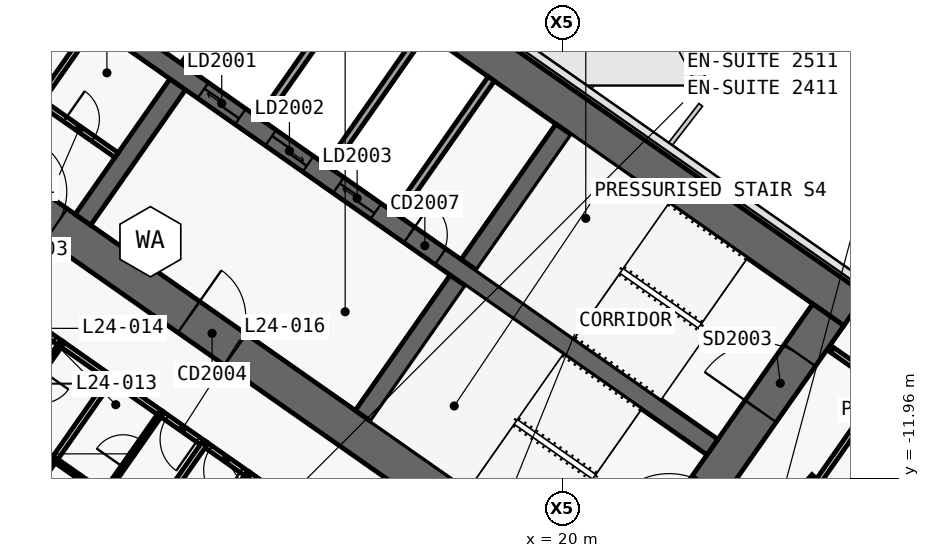
"""IFC4 building model, lengths in metres.
Left out: names, types, materials, properties, quantities, classifications, styles, units other than length and angle.
Written with IfcOpenShell. Run it as: python <this file> out.ifc"""

import sys

from ifc_helpers import new_model, si_unit, direction, frame, frame_2d, origin, place, context, subcontext, project, spatial, polyline, rectangle, outline, extrude, element, fill, save


model = new_model("IFC4")
c1 = context("Model", 3, precision=1e-05, world=origin(), true_north=direction((0.0, 1.0)))
c2 = subcontext(c1, "Body", "Model", "MODEL_VIEW")
j1 = project(units=[si_unit("LENGTHUNIT", "METRE"), si_unit("PLANEANGLEUNIT", "RADIAN")], contexts=[c1])
p1 = place(None, origin())
s1 = spatial("IfcSite", under=j1, at=p1, CompositionType="ELEMENT")
p2 = place(p1, origin())
s2 = spatial("IfcBuilding", under=s1, at=p2, CompositionType="ELEMENT")
p3 = place(p2, frame((0.0, 0.0, 112.1)))
s3 = spatial("IfcBuildingStorey", under=s2, at=p3, CompositionType="ELEMENT", Elevation=112.1)
p4 = place(p3, frame((-0.037, 11.867, 0.0), z_axis=(0.0, 0.0, 1.0), x_axis=(0.819155306259, -0.573571777746, 0.0)))
e1 = element("IfcWall", 1, at=p4, inside=s3, PredefinedType="SHEAR", context=c2, shape_type="SweptSolid", body=[
    extrude(outline(polyline([(33.837, 0.5), (0.0, 0.5), (0.7, -0.5), (33.837, -0.5), (33.837, 0.5)])), origin(), (0.0, 0.0, 1.0), 3.6),
])
p5 = place(p3, frame((-0.037, -0.585, 0.0), z_axis=(0.0, 0.0, 1.0), x_axis=(0.819157152511, -0.573569140985, 0.0)))
e2 = element("IfcWall", 2, at=p5, inside=s3, PredefinedType="SHEAR", context=c2, shape_type="SweptSolid", body=[
    extrude(outline(polyline([(26.695, 0.5), (0.0, 0.5), (0.7, -0.5), (26.695, -0.5), (26.695, 0.5)])), origin(), (0.0, 0.0, 1.0), 3.6),
])
p6 = place(p5, frame((6.695, 0.0, 0.0)))
e3 = element("IfcOpeningElement", 3, at=p6, cuts=e2, PredefinedType="OPENING", context=c2, shape_type="SweptSolid", body=[
    extrude(rectangle(XDim=1.5, YDim=2.1, at=frame_2d((0.75, 1.05))), frame((0.0, 0.51, 0.0), z_axis=(0.0, -1.0, 0.0), x_axis=(1.0, 0.0, 0.0)), (0.0, 0.0, 1.0), 1.02),
])
p7 = place(p5, frame((12.445, 0.0, 0.0)))
e4 = element("IfcOpeningElement", 4, at=p7, cuts=e2, PredefinedType="OPENING", context=c2, shape_type="SweptSolid", body=[
    extrude(rectangle(XDim=1.5, YDim=2.1, at=frame_2d((0.75, 1.05))), frame((0.0, 0.51, 0.0), z_axis=(0.0, -1.0, 0.0), x_axis=(1.0, 0.0, 0.0)), (0.0, 0.0, 1.0), 1.02),
])
p8 = place(p3, frame((21.708, -15.2, 0.0), z_axis=(0.0, 0.0, 1.0), x_axis=(0.573576324356, 0.819152122709, 0.0)))
e5 = element("IfcWall", 5, at=p8, inside=s3, PredefinedType="SHEAR", context=c2, shape_type="SweptSolid", body=[
    extrude(outline(polyline([(9.2, 0.5), (0.0, 0.5), (0.0, -0.5), (9.2, -0.5), (9.2, 0.5)])), origin(), (0.0, 0.0, 1.0), 3.6),
])
p9 = place(p8, frame((6.1, 0.0, 0.0)))
e6 = element("IfcOpeningElement", 6, at=p9, cuts=e5, PredefinedType="OPENING", context=c2, shape_type="SweptSolid", body=[
    extrude(rectangle(XDim=1.8, YDim=2.1, at=frame_2d((0.9, 1.05))), frame((0.0, 0.51, 0.0), z_axis=(0.0, -1.0, 0.0), x_axis=(1.0, 0.0, 0.0)), (0.0, 0.0, 1.0), 1.02),
])
p10 = place(p8, frame((1.9, 0.0, 0.0)))
e7 = element("IfcOpeningElement", 7, at=p10, cuts=e5, PredefinedType="OPENING", context=c2, shape_type="SweptSolid", body=[
    extrude(rectangle(XDim=1.8, YDim=2.1, at=frame_2d((0.9, 1.05))), frame((0.0, 0.51, 0.0), z_axis=(0.0, -1.0, 0.0), x_axis=(1.0, 0.0, 0.0)), (0.0, 0.0, 1.0), 1.02),
])
p11 = place(p3, frame((7.372, -5.162, 0.0), z_axis=(0.0, 0.0, 1.0), x_axis=(0.573594173421, 0.819139624372, 0.0)))
e8 = element("IfcWall", 8, at=p11, inside=s3, PredefinedType="SHEAR", context=c2, shape_type="SweptSolid", body=[
    extrude(outline(polyline([(0.0, 0.25), (0.0, -0.25), (4.35, -0.25), (4.35, 0.25), (0.0, 0.25)])), origin(), (0.0, 0.0, 1.0), 3.6),
])
p12 = place(p3, frame((10.154, -1.189, 0.0), z_axis=(0.0, 0.0, 1.0), x_axis=(0.573594173421, 0.819139624372, 0.0)))
e9 = element("IfcWall", 9, at=p12, inside=s3, PredefinedType="SHEAR", context=c2, shape_type="SweptSolid", body=[
    extrude(outline(polyline([(4.35, -0.25), (4.35, 0.25), (-0.0, 0.25), (-0.0, -0.25), (4.35, -0.25)])), origin(), (0.0, 0.0, 1.0), 3.6),
])
p13 = place(p3, frame((14.745, -10.324, 0.0), z_axis=(0.0, 0.0, 1.0), x_axis=(0.57356780395, 0.819158088694, 0.0)))
e10 = element("IfcWall", 10, at=p13, inside=s3, PredefinedType="SHEAR", context=c2, shape_type="SweptSolid", body=[
    extrude(outline(polyline([(0.0, 0.25), (0.0, -0.25), (4.35, -0.25), (4.35, 0.25), (0.0, 0.25)])), origin(), (0.0, 0.0, 1.0), 3.6),
])
p14 = place(p3, frame((17.527, -6.352, 0.0), z_axis=(0.0, 0.0, 1.0), x_axis=(0.573530143085, 0.819184457233, 0.0)))
e11 = element("IfcWall", 11, at=p14, inside=s3, PredefinedType="SHEAR", context=c2, shape_type="SweptSolid", body=[
    extrude(outline(polyline([(4.35, -0.25), (4.35, 0.25), (0.0, 0.25), (0.0, -0.25), (4.35, -0.25)])), origin(), (0.0, 0.0, 1.0), 3.6),
])
p15 = place(p3, frame((2.638, 3.768, 0.0), z_axis=(0.0, 0.0, 1.0), x_axis=(0.819148977158, -0.573580816643, 0.0)))
e12 = element("IfcWall", 12, at=p15, inside=s3, PredefinedType="SHEAR", context=c2, shape_type="SweptSolid", body=[
    extrude(outline(polyline([(0.0, 0.25), (0.0, -0.25), (26.0, -0.25), (26.0, 0.25), (0.0, 0.25)])), origin(), (0.0, 0.0, 1.0), 3.6),
])
p16 = place(p15, frame((9.637, 0.0, 0.0)))
e13 = element("IfcOpeningElement", 13, at=p16, cuts=e12, PredefinedType="OPENING", context=c2, shape_type="SweptSolid", body=[
    extrude(rectangle(XDim=1.2, YDim=2.1, at=frame_2d((0.6, 1.05))), frame((0.0, 0.26, 0.0), z_axis=(0.0, -1.0, 0.0), x_axis=(1.0, 0.0, 0.0)), (0.0, 0.0, 1.0), 0.52),
])
p17 = place(p15, frame((11.812, 0.0, 0.0)))
e14 = element("IfcOpeningElement", 14, at=p17, cuts=e12, PredefinedType="OPENING", context=c2, shape_type="SweptSolid", body=[
    extrude(rectangle(XDim=1.2, YDim=2.1, at=frame_2d((0.6, 1.05))), frame((0.0, 0.26, 0.0), z_axis=(0.0, -1.0, 0.0), x_axis=(1.0, 0.0, 0.0)), (0.0, 0.0, 1.0), 0.52),
])
p18 = place(p15, frame((13.988, 0.0, 0.0)))
e15 = element("IfcOpeningElement", 15, at=p18, cuts=e12, PredefinedType="OPENING", context=c2, shape_type="SweptSolid", body=[
    extrude(rectangle(XDim=1.2, YDim=2.1, at=frame_2d((0.6, 1.05))), frame((0.0, 0.26, 0.0), z_axis=(0.0, -1.0, 0.0), x_axis=(1.0, 0.0, 0.0)), (0.0, 0.0, 1.0), 0.52),
])
p19 = place(p15, frame((16.262, 0.0, 0.0)))
e16 = element("IfcOpeningElement", 16, at=p19, cuts=e12, PredefinedType="OPENING", context=c2, shape_type="SweptSolid", body=[
    extrude(rectangle(XDim=1.0, YDim=2.1, at=frame_2d((0.5, 1.05))), frame((0.0, 0.26, 0.0), z_axis=(0.0, -1.0, 0.0), x_axis=(1.0, 0.0, 0.0)), (0.0, 0.0, 1.0), 0.52),
])
p20 = place(p3, frame((12.059, -2.523, 0.0), z_axis=(0.0, 0.0, 1.0), x_axis=(0.573594173421, 0.819139624372, 0.0)))
e17 = element("IfcWall", 17, at=p20, inside=s3, PredefinedType="SOLIDWALL", context=c2, shape_type="SweptSolid", body=[
    extrude(rectangle(XDim=4.35, YDim=0.2, at=frame_2d((2.175, 0.0))), origin(), (0.0, 0.0, 1.0), 3.6),
])
p21 = place(p3, frame((13.84, -3.771, 0.0), z_axis=(0.0, 0.0, 1.0), x_axis=(0.57356780395, 0.819158088694, 0.0)))
e18 = element("IfcWall", 18, at=p21, inside=s3, PredefinedType="SOLIDWALL", context=c2, shape_type="SweptSolid", body=[
    extrude(rectangle(XDim=4.35, YDim=0.2, at=frame_2d((2.175, 0.0))), origin(), (0.0, 0.0, 1.0), 3.6),
])
p22 = place(p3, frame((15.622, -5.018, 0.0), z_axis=(0.0, 0.0, 1.0), x_axis=(0.573594173421, 0.819139624372, 0.0)))
e19 = element("IfcWall", 19, at=p22, inside=s3, PredefinedType="SOLIDWALL", context=c2, shape_type="SweptSolid", body=[
    extrude(rectangle(XDim=4.35, YDim=0.2, at=frame_2d((2.175, 0.0))), origin(), (0.0, 0.0, 1.0), 3.6),
])
p23 = place(p3, frame((1.745, 1.097, 0.0), z_axis=(0.0, 0.0, 1.0), x_axis=(0.819156890572, -0.573569515079, 0.0)))
e20 = element("IfcWall", 20, at=p23, inside=s3, PredefinedType="PARTITIONING", context=c2, shape_type="SweptSolid", body=[
    extrude(rectangle(XDim=7.95, YDim=0.15, at=frame_2d((3.975, 0.0))), origin(), (0.0, 0.0, 1.0), 3.32),
])
p24 = place(p23, frame((0.7, 0.0, 0.0)))
e21 = element("IfcOpeningElement", 21, at=p24, cuts=e20, PredefinedType="OPENING", context=c2, shape_type="SweptSolid", body=[
    extrude(rectangle(XDim=0.9, YDim=2.1, at=frame_2d((0.45, 1.05))), frame((0.0, 0.085, 0.0), z_axis=(0.0, -1.0, 0.0), x_axis=(1.0, 0.0, 0.0)), (0.0, 0.0, 1.0), 0.17),
])
p25 = place(p23, frame((2.6, 0.0, 0.0)))
e22 = element("IfcOpeningElement", 22, at=p25, cuts=e20, PredefinedType="OPENING", context=c2, shape_type="SweptSolid", body=[
    extrude(rectangle(XDim=0.8, YDim=2.1, at=frame_2d((0.4, 1.05))), frame((0.0, 0.085, 0.0), z_axis=(0.0, -1.0, 0.0), x_axis=(1.0, 0.0, 0.0)), (0.0, 0.0, 1.0), 0.17),
])
p26 = place(p23, frame((4.1, 0.0, 0.0)))
e23 = element("IfcOpeningElement", 23, at=p26, cuts=e20, PredefinedType="OPENING", context=c2, shape_type="SweptSolid", body=[
    extrude(rectangle(XDim=0.9, YDim=2.1, at=frame_2d((0.45, 1.05))), frame((0.0, 0.085, 0.0), z_axis=(0.0, -1.0, 0.0), x_axis=(1.0, 0.0, 0.0)), (0.0, 0.0, 1.0), 0.17),
])
p27 = place(p23, frame((6.3, 0.0, 0.0)))
e24 = element("IfcOpeningElement", 24, at=p27, cuts=e20, PredefinedType="OPENING", context=c2, shape_type="SweptSolid", body=[
    extrude(rectangle(XDim=0.9, YDim=2.1, at=frame_2d((0.45, 1.05))), frame((0.0, 0.085, 0.0), z_axis=(0.0, -1.0, 0.0), x_axis=(1.0, 0.0, 0.0)), (0.0, 0.0, 1.0), 0.17),
])
p28 = place(p3, frame((6.273, -1.981, 0.0), z_axis=(0.0, 0.0, 1.0), x_axis=(0.573579618003, 0.819149816463, 0.0)))
e25 = element("IfcWall", 25, at=p28, inside=s3, PredefinedType="PARTITIONING", context=c2, shape_type="SweptSolid", body=[
    extrude(rectangle(XDim=2.375, YDim=0.15, at=frame_2d((1.188, 0.0))), origin(), (0.0, 0.0, 1.0), 3.32),
])
p29 = place(p3, frame((6.799, -8.423, 0.0), z_axis=(0.0, 0.0, 1.0), x_axis=(-0.819207359301, 0.573497430219, 0.0)))
e26 = element("IfcWall", 26, at=p29, inside=s3, PredefinedType="PARTITIONING", context=c2, shape_type="SweptSolid", body=[
    extrude(rectangle(XDim=1.401, YDim=0.15, at=frame_2d((0.7, 0.0))), origin(), (0.0, 0.0, 1.0), 2.6),
])
p30 = place(p29, frame((0.201, 0.0, 0.0)))
e27 = element("IfcOpeningElement", 27, at=p30, cuts=e26, PredefinedType="OPENING", context=c2, shape_type="SweptSolid", body=[
    extrude(rectangle(XDim=1.0, YDim=2.1, at=frame_2d((0.5, 1.05))), frame((0.0, 0.085, 0.0), z_axis=(0.0, -1.0, 0.0), x_axis=(1.0, 0.0, 0.0)), (0.0, 0.0, 1.0), 0.17),
])
p31 = place(p3, frame((8.111, -9.342, 0.0), z_axis=(0.0, 0.0, 1.0), x_axis=(-0.8190674132, 0.573697283098, 0.0)))
e28 = element("IfcWall", 28, at=p31, inside=s3, PredefinedType="PARTITIONING", context=c2, shape_type="SweptSolid", body=[
    extrude(rectangle(XDim=1.604, YDim=0.15, at=frame_2d((0.802, 0.0))), origin(), (0.0, 0.0, 1.0), 3.32),
])
p32 = place(p3, frame((10.568, -11.062, 0.0), z_axis=(0.0, 0.0, 1.0), x_axis=(-0.81914197737, 0.573590813132, 0.0)))
e29 = element("IfcWall", 29, at=p32, inside=s3, PredefinedType="PARTITIONING", context=c2, shape_type="SweptSolid", body=[
    extrude(rectangle(XDim=1.403, YDim=0.15, at=frame_2d((0.701, 0.0))), origin(), (0.0, 0.0, 1.0), 3.32),
])
p33 = place(p32, frame((0.202, 0.0, 0.0)))
e30 = element("IfcOpeningElement", 30, at=p33, cuts=e29, PredefinedType="OPENING", context=c2, shape_type="SweptSolid", body=[
    extrude(rectangle(XDim=1.0, YDim=2.1, at=frame_2d((0.5, 1.05))), frame((0.0, 0.085, 0.0), z_axis=(0.0, -1.0, 0.0), x_axis=(1.0, 0.0, 0.0)), (0.0, 0.0, 1.0), 0.17),
])
p34 = place(p3, frame((9.421, -10.259, 0.0), z_axis=(0.0, 0.0, 1.0), x_axis=(-0.819117502046, 0.573625764625, 0.0)))
e31 = element("IfcWall", 31, at=p34, inside=s3, PredefinedType="PARTITIONING", context=c2, shape_type="SweptSolid", body=[
    extrude(rectangle(XDim=1.604, YDim=0.15, at=frame_2d((0.802, 0.0))), origin(), (0.0, 0.0, 1.0), 3.32),
])
p35 = place(p3, frame((11.714, -11.865, 0.0), z_axis=(0.0, 0.0, 1.0), x_axis=(-0.81914197737, 0.573590813132, 0.0)))
e32 = element("IfcWall", 32, at=p35, inside=s3, PredefinedType="PARTITIONING", context=c2, shape_type="SweptSolid", body=[
    extrude(rectangle(XDim=1.403, YDim=0.15, at=frame_2d((0.701, 0.0))), origin(), (0.0, 0.0, 1.0), 3.32),
])
p36 = place(p35, frame((0.201, 0.0, 0.0)))
e33 = element("IfcOpeningElement", 33, at=p36, cuts=e32, PredefinedType="OPENING", context=c2, shape_type="SweptSolid", body=[
    extrude(rectangle(XDim=1.0, YDim=2.1, at=frame_2d((0.5, 1.05))), frame((0.0, 0.085, 0.0), z_axis=(0.0, -1.0, 0.0), x_axis=(1.0, 0.0, 0.0)), (0.0, 0.0, 1.0), 0.17),
])
p37 = place(p3, frame((13.026, -12.783, 0.0), z_axis=(0.0, 0.0, 1.0), x_axis=(-0.819189013667, 0.573523634986, 0.0)))
e34 = element("IfcWall", 34, at=p37, inside=s3, PredefinedType="PARTITIONING", context=c2, shape_type="SweptSolid", body=[
    extrude(rectangle(XDim=1.604, YDim=0.15, at=frame_2d((0.802, 0.0))), origin(), (0.0, 0.0, 1.0), 2.6),
])
p38 = place(p3, frame((30.482, -8.77, 0.0), z_axis=(0.0, 0.0, 1.0), x_axis=(-0.573576058406, -0.819152308929, 0.0)))
e35 = element("IfcWall", 35, at=p38, inside=s3, PredefinedType="PARTITIONING", context=c2, shape_type="SweptSolid", body=[
    extrude(rectangle(XDim=8.501, YDim=0.15, at=frame_2d((4.25, 0.0))), origin(), (0.0, 0.0, 1.0), 2.6),
])
p39 = place(p3, frame((22.285, -16.825, 0.0), z_axis=(0.0, 0.0, 1.0), x_axis=(0.661551268245, 0.749899939647, 0.0)))
e36 = element("IfcWall", 36, at=p39, inside=s3, PredefinedType="PARTITIONING", context=c2, shape_type="SweptSolid", body=[
    extrude(rectangle(XDim=6.541, YDim=0.15, at=frame_2d((3.271, 0.0))), origin(), (0.0, 0.0, 1.0), 2.6),
])
p40 = place(p3, frame((26.746, -12.014, 0.0), z_axis=(0.0, 0.0, 1.0), x_axis=(0.573560650686, 0.819163097304, 0.0)))
e37 = element("IfcWall", 37, at=p40, inside=s3, PredefinedType="PARTITIONING", context=c2, shape_type="SweptSolid", body=[
    extrude(rectangle(XDim=3.0, YDim=0.15, at=frame_2d((1.5, 0.0))), origin(), (0.0, 0.0, 1.0), 3.32),
])
p41 = place(p3, frame((28.467, -9.556, 0.0), z_axis=(0.0, 0.0, 1.0), x_axis=(-0.819109000826, 0.573637903879, 0.0)))
e38 = element("IfcWall", 38, at=p41, inside=s3, PredefinedType="PARTITIONING", context=c2, shape_type="SweptSolid", body=[
    extrude(rectangle(XDim=1.68, YDim=0.15, at=frame_2d((0.84, 0.0))), origin(), (0.0, 0.0, 1.0), 3.32),
])
p42 = place(p3, frame((6.798, -8.422, 0.0), z_axis=(0.0, 0.0, 1.0), x_axis=(-0.573537965655, -0.819178980414, 0.0)))
e39 = element("IfcWall", 39, at=p42, inside=s3, PredefinedType="PARTITIONING", context=c2, shape_type="SweptSolid", body=[
    extrude(rectangle(XDim=2.6, YDim=0.12, at=frame_2d((1.3, 0.0))), origin(), (0.0, 0.0, 1.0), 3.32),
])
p43 = place(p42, frame((0.875, 0.0, 0.0)))
e40 = element("IfcOpeningElement", 40, at=p43, cuts=e39, PredefinedType="OPENING", context=c2, shape_type="SweptSolid", body=[
    extrude(rectangle(XDim=0.85, YDim=2.05, at=frame_2d((0.425, 1.025))), frame((0.0, 0.07, 0.0), z_axis=(0.0, -1.0, 0.0), x_axis=(1.0, 0.0, 0.0)), (0.0, 0.0, 1.0), 0.14),
])
p44 = place(p3, frame((5.307, -10.553, 0.0), z_axis=(0.0, 0.0, 1.0), x_axis=(0.819131543282, -0.57360571371, 0.0)))
e41 = element("IfcWall", 41, at=p44, inside=s3, PredefinedType="PARTITIONING", context=c2, shape_type="SweptSolid", body=[
    extrude(rectangle(XDim=1.6, YDim=0.12, at=frame_2d((0.8, 0.0))), origin(), (0.0, 0.0, 1.0), 3.32),
])
p45 = place(p3, frame((6.617, -11.471, 0.0), z_axis=(0.0, 0.0, 1.0), x_axis=(-0.573535567792, -0.819180659243, 0.0)))
e42 = element("IfcWall", 42, at=p45, inside=s3, PredefinedType="PARTITIONING", context=c2, shape_type="SweptSolid", body=[
    extrude(rectangle(XDim=4.699, YDim=0.15, at=frame_2d((2.35, 0.0))), origin(), (0.0, 0.0, 1.0), 2.5),
])
p46 = place(p3, frame((8.109, -9.34, 0.0), z_axis=(0.0, 0.0, 1.0), x_axis=(-0.573537965655, -0.819178980414, 0.0)))
e43 = element("IfcWall", 43, at=p46, inside=s3, PredefinedType="PARTITIONING", context=c2, shape_type="SweptSolid", body=[
    extrude(rectangle(XDim=2.6, YDim=0.15, at=frame_2d((1.3, 0.0))), origin(), (0.0, 0.0, 1.0), 3.32),
])
p47 = place(p3, frame((6.617, -11.471, 0.0), z_axis=(0.0, 0.0, 1.0), x_axis=(0.81918174131, -0.573534022273, 0.0)))
e44 = element("IfcWall", 44, at=p47, inside=s3, PredefinedType="PARTITIONING", context=c2, shape_type="SweptSolid", body=[
    extrude(rectangle(XDim=1.6, YDim=0.12, at=frame_2d((0.8, 0.0))), origin(), (0.0, 0.0, 1.0), 3.32),
])
p48 = place(p3, frame((7.929, -12.388, 0.0), z_axis=(0.0, 0.0, 1.0), x_axis=(0.573645091666, 0.819103967032, 0.0)))
e45 = element("IfcWall", 45, at=p48, inside=s3, PredefinedType="PARTITIONING", context=c2, shape_type="SweptSolid", body=[
    extrude(rectangle(XDim=2.6, YDim=0.12, at=frame_2d((1.3, 0.0))), origin(), (0.0, 0.0, 1.0), 3.32),
])
p49 = place(p48, frame((0.875, 0.0, 0.0)))
e46 = element("IfcOpeningElement", 46, at=p49, cuts=e45, PredefinedType="OPENING", context=c2, shape_type="SweptSolid", body=[
    extrude(rectangle(XDim=0.85, YDim=2.05, at=frame_2d((0.425, 1.025))), frame((0.0, 0.07, 0.0), z_axis=(0.0, -1.0, 0.0), x_axis=(1.0, 0.0, 0.0)), (0.0, 0.0, 1.0), 0.14),
])
p50 = place(p3, frame((10.567, -11.061, 0.0), z_axis=(0.0, 0.0, 1.0), x_axis=(-0.573579051994, -0.81915021279, 0.0)))
e47 = element("IfcWall", 47, at=p50, inside=s3, PredefinedType="PARTITIONING", context=c2, shape_type="SweptSolid", body=[
    extrude(rectangle(XDim=7.3, YDim=0.15, at=frame_2d((3.65, 0.0))), origin(), (0.0, 0.0, 1.0), 2.5),
])
p51 = place(p3, frame((11.712, -11.864, 0.0), z_axis=(0.0, 0.0, 1.0), x_axis=(-0.573537965655, -0.819178980414, 0.0)))
e48 = element("IfcWall", 48, at=p51, inside=s3, PredefinedType="PARTITIONING", context=c2, shape_type="SweptSolid", body=[
    extrude(rectangle(XDim=2.6, YDim=0.12, at=frame_2d((1.3, 0.0))), origin(), (0.0, 0.0, 1.0), 3.32),
])
p52 = place(p51, frame((0.875, 0.0, 0.0)))
e49 = element("IfcOpeningElement", 49, at=p52, cuts=e48, PredefinedType="OPENING", context=c2, shape_type="SweptSolid", body=[
    extrude(rectangle(XDim=0.85, YDim=2.05, at=frame_2d((0.425, 1.025))), frame((0.0, 0.07, 0.0), z_axis=(0.0, -1.0, 0.0), x_axis=(1.0, 0.0, 0.0)), (0.0, 0.0, 1.0), 0.14),
])
p53 = place(p16, origin())
e50 = element("IfcDoor", 50, at=p53, inside=s3, OperationType="SLIDING_TO_LEFT", PredefinedType="DOOR", context=c2, shape_type="SweptSolid", body=[
    extrude(rectangle(XDim=1.2, YDim=2.1, at=frame_2d((0.6, 1.05))), frame((0.0, 0.025, 0.0), z_axis=(0.0, -1.0, 0.0), x_axis=(1.0, 0.0, 0.0)), (0.0, 0.0, 1.0), 0.05),
])
fill(e13, e50)
p54 = place(p17, origin())
e51 = element("IfcDoor", 51, at=p54, inside=s3, OperationType="SLIDING_TO_RIGHT", PredefinedType="DOOR", context=c2, shape_type="SweptSolid", body=[
    extrude(rectangle(XDim=1.2, YDim=2.1, at=frame_2d((0.6, 1.05))), frame((0.0, 0.025, 0.0), z_axis=(0.0, -1.0, 0.0), x_axis=(1.0, 0.0, 0.0)), (0.0, 0.0, 1.0), 0.05),
])
fill(e14, e51)
p55 = place(p18, origin())
e52 = element("IfcDoor", 52, at=p55, inside=s3, OperationType="SLIDING_TO_LEFT", PredefinedType="DOOR", context=c2, shape_type="SweptSolid", body=[
    extrude(rectangle(XDim=1.2, YDim=2.1, at=frame_2d((0.6, 1.05))), frame((0.0, 0.025, 0.0), z_axis=(0.0, -1.0, 0.0), x_axis=(1.0, 0.0, 0.0)), (0.0, 0.0, 1.0), 0.05),
])
fill(e15, e52)
p56 = place(p19, origin())
e53 = element("IfcDoor", 53, at=p56, inside=s3, OperationType="SINGLE_SWING_RIGHT", PredefinedType="DOOR", context=c2, shape_type="SweptSolid", body=[
    extrude(rectangle(XDim=1.0, YDim=2.1, at=frame_2d((0.5, 1.05))), frame((0.0, 0.025, 0.0), z_axis=(0.0, -1.0, 0.0), x_axis=(1.0, 0.0, 0.0)), (0.0, 0.0, 1.0), 0.05),
])
fill(e16, e53)
p57 = place(p27, origin())
e54 = element("IfcDoor", 54, at=p57, inside=s3, OperationType="SINGLE_SWING_RIGHT", PredefinedType="DOOR", context=c2, shape_type="SweptSolid", body=[
    extrude(rectangle(XDim=0.9, YDim=2.1, at=frame_2d((0.45, 1.05))), frame((0.0, 0.025, 0.0), z_axis=(0.0, -1.0, 0.0), x_axis=(1.0, 0.0, 0.0)), (0.0, 0.0, 1.0), 0.05),
])
fill(e24, e54)
p58 = place(p6, origin())
e55 = element("IfcDoor", 55, at=p58, inside=s3, OperationType="SINGLE_SWING_RIGHT", PredefinedType="DOOR", context=c2, shape_type="SweptSolid", body=[
    extrude(rectangle(XDim=1.5, YDim=2.1, at=frame_2d((0.75, 1.05))), frame((0.0, 0.025, 0.0), z_axis=(0.0, -1.0, 0.0), x_axis=(1.0, 0.0, 0.0)), (0.0, 0.0, 1.0), 0.05),
])
fill(e3, e55)
p59 = place(p7, origin())
e56 = element("IfcDoor", 56, at=p59, inside=s3, OperationType="DOUBLE_DOOR_SINGLE_SWING", PredefinedType="DOOR", context=c2, shape_type="SweptSolid", body=[
    extrude(rectangle(XDim=1.5, YDim=2.1, at=frame_2d((0.75, 1.05))), frame((0.0, 0.025, 0.0), z_axis=(0.0, -1.0, 0.0), x_axis=(1.0, 0.0, 0.0)), (0.0, 0.0, 1.0), 0.05),
])
fill(e4, e56)
p60 = place(p9, origin())
e57 = element("IfcDoor", 57, at=p60, inside=s3, OperationType="DOUBLE_DOOR_SINGLE_SWING", PredefinedType="DOOR", context=c2, shape_type="SweptSolid", body=[
    extrude(rectangle(XDim=1.8, YDim=2.1, at=frame_2d((0.9, 1.05))), frame((0.0, 0.025, 0.0), z_axis=(0.0, -1.0, 0.0), x_axis=(1.0, 0.0, 0.0)), (0.0, 0.0, 1.0), 0.05),
])
fill(e6, e57)
p61 = place(p30, origin())
e58 = element("IfcDoor", 58, at=p61, inside=s3, OperationType="SINGLE_SWING_LEFT", PredefinedType="DOOR", context=c2, shape_type="SweptSolid", body=[
    extrude(rectangle(XDim=1.0, YDim=2.1, at=frame_2d((0.5, 1.05))), frame((0.0, 0.025, 0.0), z_axis=(0.0, -1.0, 0.0), x_axis=(1.0, 0.0, 0.0)), (0.0, 0.0, 1.0), 0.05),
])
fill(e27, e58)
p62 = place(p49, origin())
e59 = element("IfcDoor", 59, at=p62, inside=s3, OperationType="SINGLE_SWING_RIGHT", PredefinedType="DOOR", context=c2, shape_type="SweptSolid", body=[
    extrude(rectangle(XDim=0.85, YDim=2.05, at=frame_2d((0.425, 1.025))), frame((0.0, 0.025, 0.0), z_axis=(0.0, -1.0, 0.0), x_axis=(1.0, 0.0, 0.0)), (0.0, 0.0, 1.0), 0.05),
])
fill(e46, e59)
p63 = place(p33, origin())
e60 = element("IfcDoor", 60, at=p63, inside=s3, OperationType="SINGLE_SWING_LEFT", PredefinedType="DOOR", context=c2, shape_type="SweptSolid", body=[
    extrude(rectangle(XDim=1.0, YDim=2.1, at=frame_2d((0.5, 1.05))), frame((0.0, 0.025, 0.0), z_axis=(0.0, -1.0, 0.0), x_axis=(1.0, 0.0, 0.0)), (0.0, 0.0, 1.0), 0.05),
])
fill(e30, e60)
p64 = place(p36, origin())
e61 = element("IfcDoor", 61, at=p64, inside=s3, OperationType="SINGLE_SWING_LEFT", PredefinedType="DOOR", context=c2, shape_type="SweptSolid", body=[
    extrude(rectangle(XDim=1.0, YDim=2.1, at=frame_2d((0.5, 1.05))), frame((0.0, 0.025, 0.0), z_axis=(0.0, -1.0, 0.0), x_axis=(1.0, 0.0, 0.0)), (0.0, 0.0, 1.0), 0.05),
])
fill(e33, e61)
save(model, sys.argv[1])
